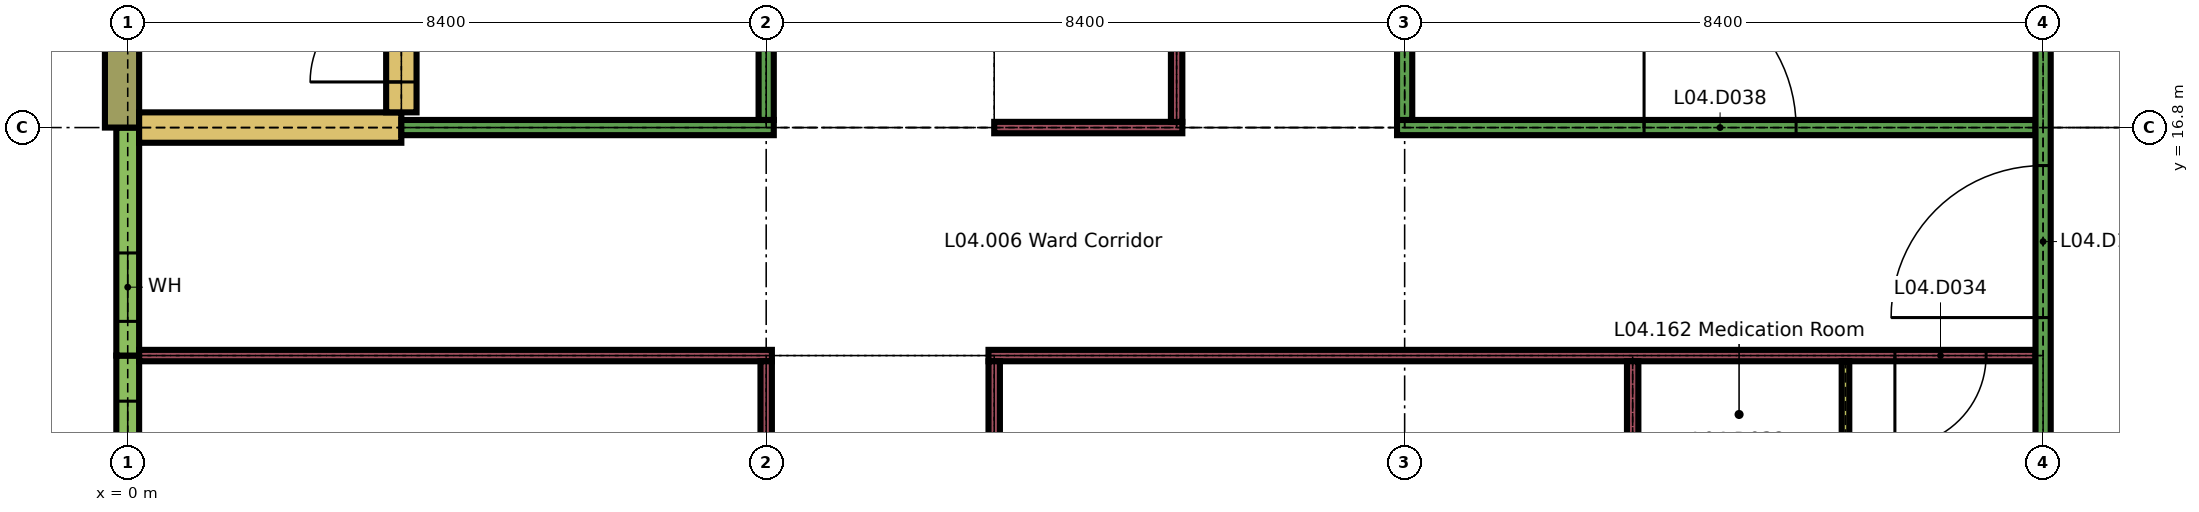
"""IFC4 building model, lengths in metres.
Left out: names, types, materials, properties, quantities, classifications, styles, units other than length and angle.
Written with IfcOpenShell. Run it as: python <this file> out.ifc"""

import sys

from ifc_helpers import new_model, si_unit, direction, frame, frame_2d, origin, place, context, subcontext, project, spatial, rectangle, extrude, element, fill, save


model = new_model("IFC4")
c1 = context("Model", 3, precision=1e-05, world=origin(), true_north=direction((0.0, 1.0)))
c2 = subcontext(c1, "Body", "Model", "MODEL_VIEW")
j1 = project(units=[si_unit("LENGTHUNIT", "METRE"), si_unit("PLANEANGLEUNIT", "RADIAN")], contexts=[c1])
p1 = place(None, origin())
s1 = spatial("IfcSite", under=j1, at=p1, CompositionType="ELEMENT")
p2 = place(p1, origin())
s2 = spatial("IfcBuilding", under=s1, at=p2, CompositionType="ELEMENT")
p3 = place(p2, frame((0.0, 0.0, 18.9)))
s3 = spatial("IfcBuildingStorey", under=s2, at=p3, CompositionType="ELEMENT", Elevation=18.9)
p4 = place(p3, frame((0.0, 11.4, 0.0), z_axis=(0.0, 0.0, 1.0), x_axis=(0.0, 1.0, 0.0)))
e1 = element("IfcWall", 1, at=p4, inside=s3, PredefinedType="SOLIDWALL", context=c2, shape_type="SweptSolid", body=[
    extrude(rectangle(XDim=2.4, YDim=0.3, at=frame_2d((1.2, 0.0))), origin(), (0.0, 0.0, 1.0), 2.96),
])
p5 = place(p4, frame((0.6, 0.0, 0.9)))
e2 = element("IfcOpeningElement", 2, at=p5, cuts=e1, PredefinedType="OPENING", context=c2, shape_type="SweptSolid", body=[
    extrude(rectangle(XDim=1.2, YDim=1.5, at=frame_2d((0.6, 0.75))), frame((0.0, 0.16, 0.0), z_axis=(0.0, -1.0, 0.0), x_axis=(1.0, 0.0, 0.0)), (0.0, 0.0, 1.0), 0.32),
])
p6 = place(p3, frame((0.0, 13.8, 0.0), z_axis=(0.0, 0.0, 1.0), x_axis=(0.0, 1.0, 0.0)))
e3 = element("IfcWall", 3, at=p6, inside=s3, PredefinedType="SOLIDWALL", context=c2, shape_type="SweptSolid", body=[
    extrude(rectangle(XDim=3.0, YDim=0.3, at=frame_2d((1.5, 0.0))), origin(), (0.0, 0.0, 1.0), 2.96),
])
p7 = place(p6, frame((0.45, 0.0, 0.9)))
e4 = element("IfcOpeningElement", 4, at=p7, cuts=e3, PredefinedType="OPENING", context=c2, shape_type="SweptSolid", body=[
    extrude(rectangle(XDim=0.9, YDim=1.5, at=frame_2d((0.45, 0.75))), frame((0.0, 0.16, 0.0), z_axis=(0.0, -1.0, 0.0), x_axis=(1.0, 0.0, 0.0)), (0.0, 0.0, 1.0), 0.32),
])
p8 = place(p3, frame((-0.075, 16.8, 0.0), z_axis=(0.0, 0.0, 1.0), x_axis=(0.0, 1.0, 0.0)))
e5 = element("IfcWall", 5, at=p8, inside=s3, PredefinedType="SOLIDWALL", context=c2, shape_type="SweptSolid", body=[
    extrude(rectangle(XDim=3.15, YDim=0.45, at=frame_2d((1.575, 0.0))), origin(), (0.0, 0.0, 1.0), 3.26),
])
p9 = place(p3, frame((0.15, 13.8, 0.0), z_axis=(0.0, 0.0, 1.0), x_axis=(1.0, 0.0, 0.0)))
e6 = element("IfcWall", 6, at=p9, inside=s3, PredefinedType="PARTITIONING", context=c2, shape_type="SweptSolid", body=[
    extrude(rectangle(XDim=8.325, YDim=0.15, at=frame_2d((4.163, 0.0))), origin(), (0.0, 0.0, 1.0), 3.26),
])
p10 = place(p3, frame((11.325, 13.8, 0.0), z_axis=(0.0, 0.0, 1.0), x_axis=(1.0, 0.0, 0.0)))
e7 = element("IfcWall", 7, at=p10, inside=s3, PredefinedType="PARTITIONING", context=c2, shape_type="SweptSolid", body=[
    extrude(rectangle(XDim=13.775, YDim=0.15, at=frame_2d((6.888, 0.0))), origin(), (0.0, 0.0, 1.0), 3.26),
])
p11 = place(p10, frame((11.925, 0.0, 0.0)))
e8 = element("IfcOpeningElement", 8, at=p11, cuts=e7, PredefinedType="OPENING", context=c2, shape_type="SweptSolid", body=[
    extrude(rectangle(XDim=1.2, YDim=2.1, at=frame_2d((0.6, 1.05))), frame((0.0, 0.085, 0.0), z_axis=(0.0, -1.0, 0.0), x_axis=(1.0, 0.0, 0.0)), (0.0, 0.0, 1.0), 0.17),
])
p12 = place(p3, frame((0.15, 16.8, 0.0), z_axis=(0.0, 0.0, 1.0), x_axis=(1.0, 0.0, 0.0)))
e9 = element("IfcWall", 9, at=p12, inside=s3, PredefinedType="SHEAR", context=c2, shape_type="SweptSolid", body=[
    extrude(rectangle(XDim=3.45, YDim=0.4, at=frame_2d((1.725, 0.0))), origin(), (0.0, 0.0, 1.0), 3.26),
])
p13 = place(p3, frame((3.6, 16.8, 0.0), z_axis=(0.0, 0.0, 1.0), x_axis=(1.0, 0.0, 0.0)))
e10 = element("IfcWall", 10, at=p13, inside=s3, PredefinedType="PARTITIONING", context=c2, shape_type="SweptSolid", body=[
    extrude(rectangle(XDim=4.9, YDim=0.2, at=frame_2d((2.45, 0.0))), origin(), (0.0, 0.0, 1.0), 3.26),
])
p14 = place(p3, frame((11.4, 16.8, 0.0), z_axis=(0.0, 0.0, 1.0), x_axis=(1.0, 0.0, 0.0)))
e11 = element("IfcWall", 11, at=p14, inside=s3, PredefinedType="PARTITIONING", context=c2, shape_type="SweptSolid", body=[
    extrude(rectangle(XDim=2.475, YDim=0.15, at=frame_2d((1.238, 0.0))), origin(), (0.0, 0.0, 1.0), 3.26),
])
p15 = place(p3, frame((16.7, 16.8, 0.0), z_axis=(0.0, 0.0, 1.0), x_axis=(1.0, 0.0, 0.0)))
e12 = element("IfcWall", 12, at=p15, inside=s3, PredefinedType="PARTITIONING", context=c2, shape_type="SweptSolid", body=[
    extrude(rectangle(XDim=8.4, YDim=0.2, at=frame_2d((4.2, 0.0))), origin(), (0.0, 0.0, 1.0), 3.26),
])
p16 = place(p15, frame((3.25, 0.0, 0.0)))
e13 = element("IfcOpeningElement", 13, at=p16, cuts=e12, PredefinedType="OPENING", context=c2, shape_type="SweptSolid", body=[
    extrude(rectangle(XDim=2.0, YDim=2.4, at=frame_2d((1.0, 1.2))), frame((0.0, 0.11, 0.0), z_axis=(0.0, -1.0, 0.0), x_axis=(1.0, 0.0, 0.0)), (0.0, 0.0, 1.0), 0.22),
])
p17 = place(p3, frame((3.6, 17.0, 0.0), z_axis=(0.0, 0.0, 1.0), x_axis=(0.0, 1.0, 0.0)))
e14 = element("IfcWall", 14, at=p17, inside=s3, PredefinedType="SHEAR", context=c2, shape_type="SweptSolid", body=[
    extrude(rectangle(XDim=8.0, YDim=0.4, at=frame_2d((4.0, 0.0))), origin(), (0.0, 0.0, 1.0), 3.26),
])
p18 = place(p17, frame((0.4, 0.0, 0.0)))
e15 = element("IfcOpeningElement", 15, at=p18, cuts=e14, PredefinedType="OPENING", context=c2, shape_type="SweptSolid", body=[
    extrude(rectangle(XDim=1.2, YDim=2.1, at=frame_2d((0.6, 1.05))), frame((0.0, 0.21, 0.0), z_axis=(0.0, -1.0, 0.0), x_axis=(1.0, 0.0, 0.0)), (0.0, 0.0, 1.0), 0.42),
])
p19 = place(p3, frame((8.4, 11.4, 0.0), z_axis=(0.0, 0.0, 1.0), x_axis=(0.0, 1.0, 0.0)))
e16 = element("IfcWall", 16, at=p19, inside=s3, PredefinedType="PARTITIONING", context=c2, shape_type="SweptSolid", body=[
    extrude(rectangle(XDim=2.325, YDim=0.15, at=frame_2d((1.163, 0.0))), origin(), (0.0, 0.0, 1.0), 3.26),
])
p20 = place(p3, frame((8.4, 16.9, 0.0), z_axis=(0.0, 0.0, 1.0), x_axis=(0.0, 1.0, 0.0)))
e17 = element("IfcWall", 17, at=p20, inside=s3, PredefinedType="PARTITIONING", context=c2, shape_type="SweptSolid", body=[
    extrude(rectangle(XDim=8.2, YDim=0.2, at=frame_2d((4.1, 0.0))), origin(), (0.0, 0.0, 1.0), 3.26),
])
p21 = place(p20, frame((3.1, 0.0, 0.0)))
e18 = element("IfcOpeningElement", 18, at=p21, cuts=e17, PredefinedType="OPENING", context=c2, shape_type="SweptSolid", body=[
    extrude(rectangle(XDim=2.0, YDim=2.4, at=frame_2d((1.0, 1.2))), frame((0.0, 0.11, 0.0), z_axis=(0.0, -1.0, 0.0), x_axis=(1.0, 0.0, 0.0)), (0.0, 0.0, 1.0), 0.22),
])
p22 = place(p3, frame((11.4, 11.4, 0.0), z_axis=(0.0, 0.0, 1.0), x_axis=(0.0, 1.0, 0.0)))
e19 = element("IfcWall", 19, at=p22, inside=s3, PredefinedType="PARTITIONING", context=c2, shape_type="SweptSolid", body=[
    extrude(rectangle(XDim=2.325, YDim=0.15, at=frame_2d((1.163, 0.0))), origin(), (0.0, 0.0, 1.0), 3.26),
])
p23 = place(p3, frame((13.8, 16.875, 0.0), z_axis=(0.0, 0.0, 1.0), x_axis=(0.0, 1.0, 0.0)))
e20 = element("IfcWall", 20, at=p23, inside=s3, PredefinedType="PARTITIONING", context=c2, shape_type="SweptSolid", body=[
    extrude(rectangle(XDim=8.225, YDim=0.15, at=frame_2d((4.113, 0.0))), origin(), (0.0, 0.0, 1.0), 3.26),
])
p24 = place(p3, frame((16.8, 16.9, 0.0), z_axis=(0.0, 0.0, 1.0), x_axis=(0.0, 1.0, 0.0)))
e21 = element("IfcWall", 21, at=p24, inside=s3, PredefinedType="PARTITIONING", context=c2, shape_type="SweptSolid", body=[
    extrude(rectangle(XDim=4.7, YDim=0.2, at=frame_2d((2.35, 0.0))), origin(), (0.0, 0.0, 1.0), 3.26),
])
p25 = place(p3, frame((19.8, 11.475, 0.0), z_axis=(0.0, 0.0, 1.0), x_axis=(0.0, 1.0, 0.0)))
e22 = element("IfcWall", 22, at=p25, inside=s3, PredefinedType="PARTITIONING", context=c2, shape_type="SweptSolid", body=[
    extrude(rectangle(XDim=2.25, YDim=0.15, at=frame_2d((1.125, 0.0))), origin(), (0.0, 0.0, 1.0), 3.26),
])
p26 = place(p3, frame((22.6, 11.475, 0.0), z_axis=(0.0, 0.0, 1.0), x_axis=(0.0, 1.0, 0.0)))
e23 = element("IfcWall", 23, at=p26, inside=s3, PredefinedType="PARTITIONING", context=c2, shape_type="SweptSolid", body=[
    extrude(rectangle(XDim=2.25, YDim=0.1, at=frame_2d((1.125, 0.0))), origin(), (0.0, 0.0, 1.0), 3.26),
])
p27 = place(p3, frame((25.2, 8.75, 0.0), z_axis=(0.0, 0.0, 1.0), x_axis=(0.0, 1.0, 0.0)))
e24 = element("IfcWall", 24, at=p27, inside=s3, PredefinedType="PARTITIONING", context=c2, shape_type="SweptSolid", body=[
    extrude(rectangle(XDim=12.85, YDim=0.2, at=frame_2d((6.425, 0.0))), origin(), (0.0, 0.0, 1.0), 3.26),
])
p28 = place(p27, frame((0.325, 0.0, 0.0)))
e25 = element("IfcOpeningElement", 25, at=p28, cuts=e24, PredefinedType="OPENING", context=c2, shape_type="SweptSolid", body=[
    extrude(rectangle(XDim=2.0, YDim=2.4, at=frame_2d((1.0, 1.2))), frame((0.0, 0.11, 0.0), z_axis=(0.0, -1.0, 0.0), x_axis=(1.0, 0.0, 0.0)), (0.0, 0.0, 1.0), 0.22),
])
p29 = place(p27, frame((5.55, 0.0, 0.0)))
e26 = element("IfcOpeningElement", 26, at=p29, cuts=e24, PredefinedType="OPENING", context=c2, shape_type="SweptSolid", body=[
    extrude(rectangle(XDim=2.0, YDim=2.4, at=frame_2d((1.0, 1.2))), frame((0.0, 0.11, 0.0), z_axis=(0.0, -1.0, 0.0), x_axis=(1.0, 0.0, 0.0)), (0.0, 0.0, 1.0), 0.22),
])
p30 = place(p5, origin())
e27 = element("IfcWindow", 27, at=p30, inside=s3, PartitioningType="SINGLE_PANEL", PredefinedType="WINDOW", context=c2, shape_type="SweptSolid", body=[
    extrude(rectangle(XDim=1.2, YDim=1.5, at=frame_2d((0.6, 0.75))), frame((0.0, 0.03, 0.0), z_axis=(0.0, -1.0, 0.0), x_axis=(1.0, 0.0, 0.0)), (0.0, 0.0, 1.0), 0.06),
])
fill(e2, e27)
p31 = place(p7, origin())
e28 = element("IfcWindow", 28, at=p31, inside=s3, PartitioningType="SINGLE_PANEL", PredefinedType="WINDOW", context=c2, shape_type="SweptSolid", body=[
    extrude(rectangle(XDim=0.9, YDim=1.5, at=frame_2d((0.45, 0.75))), frame((0.0, 0.03, 0.0), z_axis=(0.0, -1.0, 0.0), x_axis=(1.0, 0.0, 0.0)), (0.0, 0.0, 1.0), 0.06),
])
fill(e4, e28)
p32 = place(p11, origin())
e29 = element("IfcDoor", 29, at=p32, inside=s3, OperationType="SINGLE_SWING_LEFT", PredefinedType="DOOR", context=c2, shape_type="SweptSolid", body=[
    extrude(rectangle(XDim=1.2, YDim=2.1, at=frame_2d((0.6, 1.05))), frame((0.0, 0.025, 0.0), z_axis=(0.0, -1.0, 0.0), x_axis=(1.0, 0.0, 0.0)), (0.0, 0.0, 1.0), 0.05),
])
fill(e8, e29)
p33 = place(p16, origin())
e30 = element("IfcDoor", 30, at=p33, inside=s3, OperationType="SINGLE_SWING_RIGHT", PredefinedType="DOOR", context=c2, shape_type="SweptSolid", body=[
    extrude(rectangle(XDim=2.0, YDim=2.4, at=frame_2d((1.0, 1.2))), frame((0.0, 0.03, 0.0), z_axis=(0.0, -1.0, 0.0), x_axis=(1.0, 0.0, 0.0)), (0.0, 0.0, 1.0), 0.06),
])
fill(e13, e30)
p34 = place(p18, origin())
e31 = element("IfcDoor", 31, at=p34, inside=s3, OperationType="SINGLE_SWING_RIGHT", PredefinedType="DOOR", context=c2, shape_type="SweptSolid", body=[
    extrude(rectangle(XDim=1.2, YDim=2.1, at=frame_2d((0.6, 1.05))), frame((0.0, 0.025, 0.0), z_axis=(0.0, -1.0, 0.0), x_axis=(1.0, 0.0, 0.0)), (0.0, 0.0, 1.0), 0.05),
])
fill(e15, e31)
p35 = place(p29, origin())
e32 = element("IfcDoor", 32, at=p35, inside=s3, OperationType="SINGLE_SWING_RIGHT", PredefinedType="DOOR", context=c2, shape_type="SweptSolid", body=[
    extrude(rectangle(XDim=2.0, YDim=2.4, at=frame_2d((1.0, 1.2))), frame((0.0, 0.03, 0.0), z_axis=(0.0, -1.0, 0.0), x_axis=(1.0, 0.0, 0.0)), (0.0, 0.0, 1.0), 0.06),
])
fill(e26, e32)
save(model, sys.argv[1])
